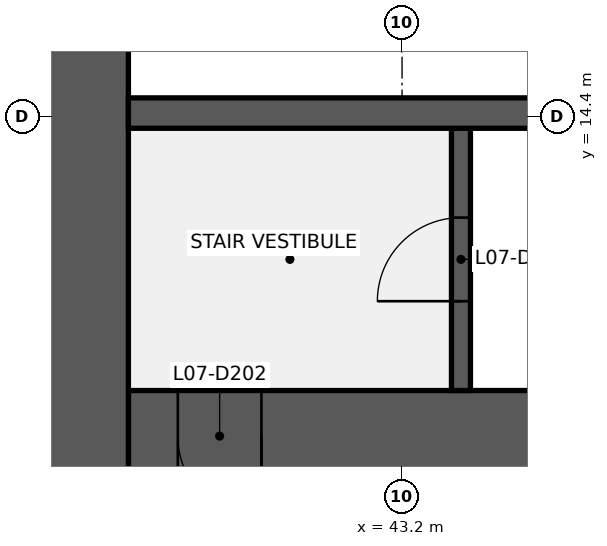
"""IFC4 building model, lengths in metres.
Left out: names, types, materials, properties, quantities, classifications, styles, units other than length and angle.
Written with IfcOpenShell. Run it as: python <this file> out.ifc"""

import sys

from ifc_helpers import new_model, si_unit, direction, frame, frame_2d, origin, place, context, subcontext, project, spatial, rectangle, extrude, element, fill, save


model = new_model("IFC4")
c1 = context("Model", 3, precision=1e-05, world=origin(), true_north=direction((0.0, 1.0)))
c2 = subcontext(c1, "Body", "Model", "MODEL_VIEW")
j1 = project(units=[si_unit("LENGTHUNIT", "METRE"), si_unit("PLANEANGLEUNIT", "RADIAN")], contexts=[c1])
p1 = place(None, origin())
s1 = spatial("IfcSite", under=j1, at=p1, CompositionType="ELEMENT")
p2 = place(p1, origin())
s2 = spatial("IfcBuilding", under=s1, at=p2, CompositionType="ELEMENT")
p3 = place(p2, frame((0.0, 0.0, 39.0)))
s3 = spatial("IfcBuildingStorey", under=s2, at=p3, CompositionType="ELEMENT", Elevation=39.0)
p4 = place(p3, frame((52.8, 10.2, 0.0), z_axis=(0.0, 0.0, 1.0), x_axis=(-1.0, 0.0, 0.0)))
e1 = element("IfcWall", 1, at=p4, inside=s3, PredefinedType="SHEAR", context=c2, shape_type="SweptSolid", body=[
    extrude(rectangle(XDim=13.2, YDim=1.2, at=frame_2d((6.6, 0.0))), origin(), (0.0, 0.0, 1.0), 3.84),
])
p5 = place(p4, frame((11.45, 0.0, 0.0)))
e2 = element("IfcOpeningElement", 2, at=p5, cuts=e1, PredefinedType="OPENING", context=c2, shape_type="SweptSolid", body=[
    extrude(rectangle(XDim=1.1, YDim=2.1, at=frame_2d((0.55, 1.05))), frame((0.0, 0.61, 0.0), z_axis=(0.0, -1.0, 0.0), x_axis=(1.0, 0.0, 0.0)), (0.0, 0.0, 1.0), 1.22),
])
p6 = place(p3, frame((39.0, 9.6, 0.0), z_axis=(0.0, 0.0, 1.0), x_axis=(0.0, 1.0, 0.0)))
e3 = element("IfcWall", 3, at=p6, inside=s3, PredefinedType="SHEAR", context=c2, shape_type="SweptSolid", body=[
    extrude(rectangle(XDim=28.8, YDim=1.2, at=frame_2d((14.4, 0.0))), origin(), (0.0, 0.0, 1.0), 3.84),
])
p7 = place(p6, frame((8.7, 0.0, 0.0)))
e4 = element("IfcOpeningElement", 4, at=p7, cuts=e3, PredefinedType="OPENING", context=c2, shape_type="SweptSolid", body=[
    extrude(rectangle(XDim=1.8, YDim=2.1, at=frame_2d((0.9, 1.05))), frame((0.0, 0.61, 0.0), z_axis=(0.0, -1.0, 0.0), x_axis=(1.0, 0.0, 0.0)), (0.0, 0.0, 1.0), 1.22),
])
p8 = place(p6, frame((18.3, 0.0, 0.0)))
e5 = element("IfcOpeningElement", 5, at=p8, cuts=e3, PredefinedType="OPENING", context=c2, shape_type="SweptSolid", body=[
    extrude(rectangle(XDim=1.8, YDim=2.1, at=frame_2d((0.9, 1.05))), frame((0.0, 0.61, 0.0), z_axis=(0.0, -1.0, 0.0), x_axis=(1.0, 0.0, 0.0)), (0.0, 0.0, 1.0), 1.22),
])
p9 = place(p3, frame((43.975, 10.8, 0.0), z_axis=(0.0, 0.0, 1.0), x_axis=(0.0, 1.0, 0.0)))
e6 = element("IfcWall", 6, at=p9, inside=s3, PredefinedType="SHEAR", context=c2, shape_type="SweptSolid", body=[
    extrude(rectangle(XDim=3.45, YDim=0.25, at=frame_2d((1.725, 0.0))), origin(), (0.0, 0.0, 1.0), 3.84),
])
p10 = place(p9, frame((1.175, 0.0, 0.0)))
e7 = element("IfcOpeningElement", 7, at=p10, cuts=e6, PredefinedType="OPENING", context=c2, shape_type="SweptSolid", body=[
    extrude(rectangle(XDim=1.1, YDim=2.1, at=frame_2d((0.55, 1.05))), frame((0.0, 0.135, 0.0), z_axis=(0.0, -1.0, 0.0), x_axis=(1.0, 0.0, 0.0)), (0.0, 0.0, 1.0), 0.27),
])
p11 = place(p3, frame((39.6, 14.45, 0.0), z_axis=(0.0, 0.0, 1.0), x_axis=(1.0, 0.0, 0.0)))
e8 = element("IfcWall", 8, at=p11, inside=s3, PredefinedType="SHEAR", context=c2, shape_type="SweptSolid", body=[
    extrude(rectangle(XDim=16.8, YDim=0.4, at=frame_2d((8.4, 0.0))), origin(), (0.0, 0.0, 1.0), 3.84),
])
p12 = place(p10, origin())
e9 = element("IfcDoor", 9, at=p12, inside=s3, OperationType="SINGLE_SWING_LEFT", PredefinedType="DOOR", context=c2, shape_type="SweptSolid", body=[
    extrude(rectangle(XDim=1.1, YDim=2.1, at=frame_2d((0.55, 1.05))), frame((0.0, 0.025, 0.0), z_axis=(0.0, -1.0, 0.0), x_axis=(1.0, 0.0, 0.0)), (0.0, 0.0, 1.0), 0.05),
])
fill(e7, e9)
p13 = place(p5, origin())
e10 = element("IfcDoor", 10, at=p13, inside=s3, OperationType="SINGLE_SWING_LEFT", PredefinedType="DOOR", context=c2, shape_type="SweptSolid", body=[
    extrude(rectangle(XDim=1.1, YDim=2.1, at=frame_2d((0.55, 1.05))), frame((0.0, 0.025, 0.0), z_axis=(0.0, -1.0, 0.0), x_axis=(1.0, 0.0, 0.0)), (0.0, 0.0, 1.0), 0.05),
])
fill(e2, e10)
save(model, sys.argv[1])
